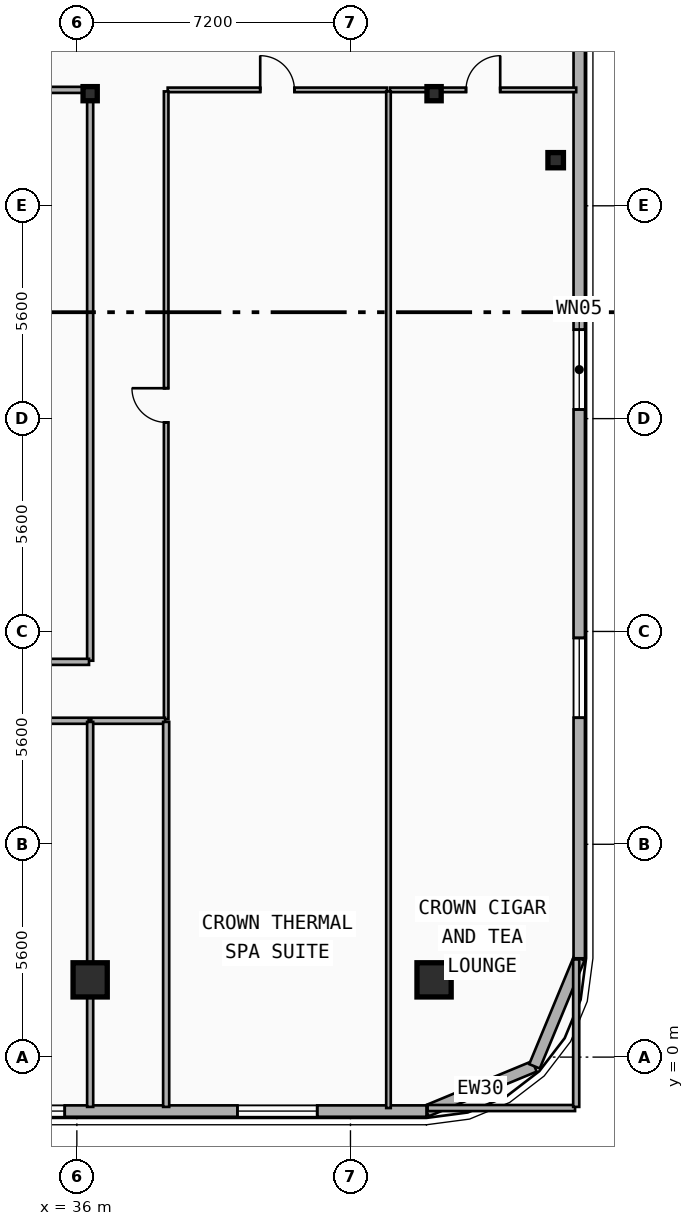
"""IFC4 building model, lengths in metres.
Left out: names, types, materials, properties, quantities, classifications, styles, units other than length and angle.
Written with IfcOpenShell. Run it as: python <this file> out.ifc"""

import sys

from ifc_helpers import new_model, si_unit, direction, frame, frame_2d, origin, origin_2d, place, context, subcontext, project, spatial, rectangle, i_section, extrude, element, fill, save


model = new_model("IFC4")
c1 = context("Model", 3, precision=1e-05, world=origin(), true_north=direction((0.0, 1.0)))
c2 = subcontext(c1, "Body", "Model", "MODEL_VIEW")
j1 = project(units=[si_unit("LENGTHUNIT", "METRE"), si_unit("PLANEANGLEUNIT", "RADIAN")], contexts=[c1])
p1 = place(None, origin())
s1 = spatial("IfcSite", under=j1, at=p1, CompositionType="ELEMENT")
p2 = place(p1, origin())
s2 = spatial("IfcBuilding", under=s1, at=p2, CompositionType="ELEMENT")
p3 = place(p2, frame((0.0, 0.0, 265.8)))
s3 = spatial("IfcBuildingStorey", under=s2, at=p3, CompositionType="ELEMENT", Elevation=265.8)
for number, where, z_axis, x_axis in (
    (1, (36.35, 25.35, 0.0), (0.0, 0.0, 1.0), (1.0, 0.0, 0.0)),
    (2, (45.4, 25.35, 0.0), (0.0, 0.0, 1.0), (1.0, 0.0, 0.0)),
):
    element("IfcColumn", number, at=place(p3, frame(where, z_axis=z_axis, x_axis=x_axis)), inside=s3, PredefinedType="COLUMN", context=c2, shape_type="SweptSolid", body=[
        extrude(i_section(OverallWidth=0.374, OverallDepth=0.372, WebThickness=0.017, FlangeThickness=0.027, FilletRadius=0.015, at=origin_2d()), origin(), (0.0, 0.0, 1.0), 3.7),
    ])
for number, where, z_axis, x_axis in (
    (3, (36.35, 2.141, 0.0), (0.0, -0.09, 0.996), (1.0, 0.0, 0.0)),
    (4, (45.4, 2.141, 0.0), (0.0, -0.09, 0.996), (1.0, 0.0, 0.0)),
):
    element("IfcColumn", number, at=place(p3, frame(where, z_axis=z_axis, x_axis=x_axis)), inside=s3, PredefinedType="COLUMN", context=c2, shape_type="SweptSolid", body=[
        extrude(rectangle(XDim=0.9, YDim=0.9, at=origin_2d()), origin(), (0.0, 0.0, 1.0), 3.715),
    ])
p4 = place(p3, frame((48.6, 23.6, 0.0), z_axis=(0.0, 0.0, 1.0), x_axis=(1.0, 0.0, 0.0)))
e5 = element("IfcColumn", 5, at=p4, inside=s3, PredefinedType="COLUMN", context=c2, shape_type="SweptSolid", body=[
    extrude(i_section(OverallWidth=0.408, OverallDepth=0.4, WebThickness=0.025, FlangeThickness=0.039, FilletRadius=0.015, at=origin_2d()), origin(), (0.0, 0.0, 1.0), 3.7),
])
p5 = place(p3, frame((48.042, -0.243, 0.0), z_axis=(0.0, 0.0, 1.0), x_axis=(-0.92389884758, -0.382636798336, 0.0)))
e6 = element("IfcWall", 6, at=p5, inside=s3, PredefinedType="SOLIDWALL", context=c2, shape_type="SweptSolid", body=[
    extrude(rectangle(XDim=3.077, YDim=0.3, at=frame_2d((1.538, 0.0))), origin(), (0.0, 0.0, 1.0), 3.42),
])
p6 = place(p3, frame((49.22, 2.6, 0.0), z_axis=(0.0, 0.0, 1.0), x_axis=(-0.382676475685, -0.923882414032, 0.0)))
e7 = element("IfcWall", 7, at=p6, inside=s3, PredefinedType="SOLIDWALL", context=c2, shape_type="SweptSolid", body=[
    extrude(rectangle(XDim=3.077, YDim=0.3, at=frame_2d((1.539, 0.0))), origin(), (0.0, 0.0, 1.0), 3.42),
])
p7 = place(p3, frame((49.22, 36.8, 0.0), z_axis=(0.0, 0.0, 1.0), x_axis=(0.0, -1.0, 0.0)))
e8 = element("IfcWall", 8, at=p7, inside=s3, PredefinedType="SOLIDWALL", context=c2, shape_type="SweptSolid", body=[
    extrude(rectangle(XDim=34.2, YDim=0.3, at=frame_2d((17.1, 0.0))), origin(), (0.0, 0.0, 1.0), 3.42),
])
p8 = place(p7, frame((17.66, 0.0, 0.75)))
e9 = element("IfcOpeningElement", 9, at=p8, cuts=e8, PredefinedType="OPENING", context=c2, shape_type="SweptSolid", body=[
    extrude(rectangle(XDim=2.1, YDim=2.1, at=frame_2d((1.05, 1.05))), frame((0.0, 0.16, 0.0), z_axis=(0.0, -1.0, 0.0), x_axis=(1.0, 0.0, 0.0)), (0.0, 0.0, 1.0), 0.32),
])
p9 = place(p7, frame((25.77, 0.0, 0.75)))
e10 = element("IfcOpeningElement", 10, at=p9, cuts=e8, PredefinedType="OPENING", context=c2, shape_type="SweptSolid", body=[
    extrude(rectangle(XDim=2.1, YDim=2.1, at=frame_2d((1.05, 1.05))), frame((0.0, 0.16, 0.0), z_axis=(0.0, -1.0, 0.0), x_axis=(1.0, 0.0, 0.0)), (0.0, 0.0, 1.0), 0.32),
])
p10 = place(p3, frame((45.2, -1.42, 0.0), z_axis=(0.0, 0.0, 1.0), x_axis=(-1.0, 0.0, 0.0)))
e11 = element("IfcWall", 11, at=p10, inside=s3, PredefinedType="SOLIDWALL", context=c2, shape_type="SweptSolid", body=[
    extrude(rectangle(XDim=32.8, YDim=0.3, at=frame_2d((16.4, 0.0))), origin(), (0.0, 0.0, 1.0), 3.42),
])
p11 = place(p10, frame((27.825, 0.0, 0.75)))
e12 = element("IfcOpeningElement", 12, at=p11, cuts=e11, PredefinedType="OPENING", context=c2, shape_type="SweptSolid", body=[
    extrude(rectangle(XDim=2.1, YDim=2.1, at=frame_2d((1.05, 1.05))), frame((0.0, 0.16, 0.0), z_axis=(0.0, -1.0, 0.0), x_axis=(1.0, 0.0, 0.0)), (0.0, 0.0, 1.0), 0.32),
])
p12 = place(p10, frame((20.136, 0.0, 0.75)))
e13 = element("IfcOpeningElement", 13, at=p12, cuts=e11, PredefinedType="OPENING", context=c2, shape_type="SweptSolid", body=[
    extrude(rectangle(XDim=2.1, YDim=2.1, at=frame_2d((1.05, 1.05))), frame((0.0, 0.16, 0.0), z_axis=(0.0, -1.0, 0.0), x_axis=(1.0, 0.0, 0.0)), (0.0, 0.0, 1.0), 0.32),
])
p13 = place(p10, frame((23.163, 0.0, 0.68)))
e14 = element("IfcOpeningElement", 14, at=p13, cuts=e11, PredefinedType="OPENING", context=c2, shape_type="SweptSolid", body=[
    extrude(rectangle(XDim=1.2, YDim=1.5, at=frame_2d((0.6, 0.75))), frame((0.0, 0.16, 0.0), z_axis=(0.0, -1.0, 0.0), x_axis=(1.0, 0.0, 0.0)), (0.0, 0.0, 1.0), 0.32),
])
p14 = place(p10, frame((16.831, 0.0, 0.75)))
e15 = element("IfcOpeningElement", 15, at=p14, cuts=e11, PredefinedType="OPENING", context=c2, shape_type="SweptSolid", body=[
    extrude(rectangle(XDim=2.1, YDim=2.1, at=frame_2d((1.05, 1.05))), frame((0.0, 0.16, 0.0), z_axis=(0.0, -1.0, 0.0), x_axis=(1.0, 0.0, 0.0)), (0.0, 0.0, 1.0), 0.32),
])
p15 = place(p10, frame((9.519, 0.0, 0.75)))
e16 = element("IfcOpeningElement", 16, at=p15, cuts=e11, PredefinedType="OPENING", context=c2, shape_type="SweptSolid", body=[
    extrude(rectangle(XDim=2.1, YDim=2.1, at=frame_2d((1.05, 1.05))), frame((0.0, 0.16, 0.0), z_axis=(0.0, -1.0, 0.0), x_axis=(1.0, 0.0, 0.0)), (0.0, 0.0, 1.0), 0.32),
])
p16 = place(p10, frame((13.176, 0.0, 0.75)))
e17 = element("IfcOpeningElement", 17, at=p16, cuts=e11, PredefinedType="OPENING", context=c2, shape_type="SweptSolid", body=[
    extrude(rectangle(XDim=2.1, YDim=2.1, at=frame_2d((1.05, 1.05))), frame((0.0, 0.16, 0.0), z_axis=(0.0, -1.0, 0.0), x_axis=(1.0, 0.0, 0.0)), (0.0, 0.0, 1.0), 0.32),
])
p17 = place(p10, frame((2.875, 0.0, 0.75)))
e18 = element("IfcOpeningElement", 18, at=p17, cuts=e11, PredefinedType="OPENING", context=c2, shape_type="SweptSolid", body=[
    extrude(rectangle(XDim=2.1, YDim=2.1, at=frame_2d((1.05, 1.05))), frame((0.0, 0.16, 0.0), z_axis=(0.0, -1.0, 0.0), x_axis=(1.0, 0.0, 0.0)), (0.0, 0.0, 1.0), 0.32),
])
p18 = place(p3, frame((38.39, 25.45, 0.0), z_axis=(0.0, 0.0, 1.0), x_axis=(1.0, 0.0, 0.0)))
e19 = element("IfcWall", 19, at=p18, inside=s3, PredefinedType="PARTITIONING", context=c2, shape_type="SweptSolid", body=[
    extrude(rectangle(XDim=5.77, YDim=0.12, at=frame_2d((2.885, 0.0))), origin(), (0.0, 0.0, 1.0), 3.42),
])
p19 = place(p18, frame((2.435, 0.0, 0.0)))
e20 = element("IfcOpeningElement", 20, at=p19, cuts=e19, PredefinedType="OPENING", context=c2, shape_type="SweptSolid", body=[
    extrude(rectangle(XDim=0.9, YDim=2.1, at=frame_2d((0.45, 1.05))), frame((0.0, 0.07, 0.0), z_axis=(0.0, -1.0, 0.0), x_axis=(1.0, 0.0, 0.0)), (0.0, 0.0, 1.0), 0.14),
])
p20 = place(p3, frame((44.24, 25.45, 0.0), z_axis=(0.0, 0.0, 1.0), x_axis=(1.0, 0.0, 0.0)))
e21 = element("IfcWall", 21, at=p20, inside=s3, PredefinedType="PARTITIONING", context=c2, shape_type="SweptSolid", body=[
    extrude(rectangle(XDim=4.9, YDim=0.12, at=frame_2d((2.45, 0.0))), origin(), (0.0, 0.0, 1.0), 2.7),
])
p21 = place(p20, frame((2.0, 0.0, 0.0)))
e22 = element("IfcOpeningElement", 22, at=p21, cuts=e21, PredefinedType="OPENING", context=c2, shape_type="SweptSolid", body=[
    extrude(rectangle(XDim=0.9, YDim=2.1, at=frame_2d((0.45, 1.05))), frame((0.0, 0.07, 0.0), z_axis=(0.0, -1.0, 0.0), x_axis=(1.0, 0.0, 0.0)), (0.0, 0.0, 1.0), 0.14),
])
p22 = place(p3, frame((38.35, 8.89, 0.0), z_axis=(0.0, 0.0, 1.0), x_axis=(0.0, 1.0, 0.0)))
e23 = element("IfcWall", 23, at=p22, inside=s3, PredefinedType="PARTITIONING", context=c2, shape_type="SweptSolid", body=[
    extrude(rectangle(XDim=16.52, YDim=0.12, at=frame_2d((8.26, 0.0))), origin(), (0.0, 0.0, 1.0), 2.91),
])
p23 = place(p22, frame((7.81, 0.0, 0.0)))
e24 = element("IfcOpeningElement", 24, at=p23, cuts=e23, PredefinedType="OPENING", context=c2, shape_type="SweptSolid", body=[
    extrude(rectangle(XDim=0.9, YDim=2.1, at=frame_2d((0.45, 1.05))), frame((0.0, 0.07, 0.0), z_axis=(0.0, -1.0, 0.0), x_axis=(1.0, 0.0, 0.0)), (0.0, 0.0, 1.0), 0.14),
])
p24 = place(p3, frame((32.952, 8.85, 0.0), z_axis=(0.0, 0.0, 1.0), x_axis=(1.0, 0.0, 0.0)))
e25 = element("IfcWall", 25, at=p24, inside=s3, PredefinedType="PARTITIONING", context=c2, shape_type="SweptSolid", body=[
    extrude(rectangle(XDim=3.358, YDim=0.16, at=frame_2d((1.679, 0.0))), origin(), (0.0, 0.0, 1.0), 2.7),
])
p25 = place(p24, frame((1.179, 0.0, 0.0)))
e26 = element("IfcOpeningElement", 26, at=p25, cuts=e25, PredefinedType="OPENING", context=c2, shape_type="SweptSolid", body=[
    extrude(rectangle(XDim=1.0, YDim=2.15, at=frame_2d((0.5, 1.075))), frame((0.0, 0.09, 0.0), z_axis=(0.0, -1.0, 0.0), x_axis=(1.0, 0.0, 0.0)), (0.0, 0.0, 1.0), 0.18),
])
p26 = place(p3, frame((44.2, -1.34, 0.0), z_axis=(0.0, 0.0, 1.0), x_axis=(0.0, 1.0, 0.0)))
e27 = element("IfcWall", 27, at=p26, inside=s3, PredefinedType="PARTITIONING", context=c2, shape_type="SweptSolid", body=[
    extrude(rectangle(XDim=26.75, YDim=0.12, at=frame_2d((13.375, 0.0))), origin(), (0.0, 0.0, 1.0), 2.91),
])
p27 = place(p3, frame((20.48, 25.45, 0.0), z_axis=(0.0, 0.0, 1.0), x_axis=(1.0, 0.0, 0.0)))
e28 = element("IfcWall", 28, at=p27, inside=s3, PredefinedType="PARTITIONING", context=c2, shape_type="SweptSolid", body=[
    extrude(rectangle(XDim=15.84, YDim=0.16, at=frame_2d((7.92, 0.0))), origin(), (0.0, 0.0, 1.0), 2.7),
])
p28 = place(p3, frame((36.38, 8.85, 0.0), z_axis=(0.0, 0.0, 1.0), x_axis=(1.0, 0.0, 0.0)))
e29 = element("IfcWall", 29, at=p28, inside=s3, PredefinedType="PARTITIONING", context=c2, shape_type="SweptSolid", body=[
    extrude(rectangle(XDim=1.94, YDim=0.16, at=frame_2d((0.97, 0.0))), origin(), (0.0, 0.0, 1.0), 2.7),
])
p29 = place(p3, frame((36.35, 10.43, 0.0), z_axis=(0.0, 0.0, 1.0), x_axis=(0.0, 1.0, 0.0)))
e30 = element("IfcWall", 30, at=p29, inside=s3, PredefinedType="PARTITIONING", context=c2, shape_type="SweptSolid", body=[
    extrude(rectangle(XDim=14.99, YDim=0.16, at=frame_2d((7.495, 0.0))), origin(), (0.0, 0.0, 1.0), 2.7),
])
p30 = place(p3, frame((34.48, 10.4, 0.0), z_axis=(0.0, 0.0, 1.0), x_axis=(1.0, 0.0, 0.0)))
e31 = element("IfcWall", 31, at=p30, inside=s3, PredefinedType="PARTITIONING", context=c2, shape_type="SweptSolid", body=[
    extrude(rectangle(XDim=1.84, YDim=0.16, at=frame_2d((0.92, 0.0))), origin(), (0.0, 0.0, 1.0), 2.7),
])
p31 = place(p3, frame((36.35, -1.31, 0.0), z_axis=(0.0, 0.0, 1.0), x_axis=(0.0, 1.0, 0.0)))
e32 = element("IfcWall", 32, at=p31, inside=s3, PredefinedType="PARTITIONING", context=c2, shape_type="SweptSolid", body=[
    extrude(rectangle(XDim=10.13, YDim=0.16, at=frame_2d((5.065, 0.0))), origin(), (0.0, 0.0, 1.0), 2.7),
])
p32 = place(p3, frame((38.35, -1.31, 0.0), z_axis=(0.0, 0.0, 1.0), x_axis=(0.0, 1.0, 0.0)))
e33 = element("IfcWall", 33, at=p32, inside=s3, PredefinedType="PARTITIONING", context=c2, shape_type="SweptSolid", body=[
    extrude(rectangle(XDim=10.13, YDim=0.16, at=frame_2d((5.065, 0.0))), origin(), (0.0, 0.0, 1.0), 2.91),
])
for number, where, z_axis, x_axis in (
    (34, (45.23, -1.34, 0.0), (0.0, 0.0, 1.0), (1.0, 0.0, 0.0)),
    (35, (49.14, -1.31, 0.0), (0.0, 0.0, 1.0), (0.0, 1.0, 0.0)),
):
    element("IfcWall", number, at=place(p3, frame(where, z_axis=z_axis, x_axis=x_axis)), inside=s3, PredefinedType="PARTITIONING", context=c2, shape_type="SweptSolid", body=[
        extrude(rectangle(XDim=3.88, YDim=0.16, at=frame_2d((1.94, 0.0))), origin(), (0.0, 0.0, 1.0), 3.42),
    ])
p33 = place(p8, origin())
e36 = element("IfcWindow", 36, at=p33, inside=s3, PartitioningType="SINGLE_PANEL", PredefinedType="WINDOW", context=c2, shape_type="SweptSolid", body=[
    extrude(rectangle(XDim=2.1, YDim=2.1, at=frame_2d((1.05, 1.05))), frame((0.0, 0.03, 0.0), z_axis=(0.0, -1.0, 0.0), x_axis=(1.0, 0.0, 0.0)), (0.0, 0.0, 1.0), 0.06),
])
fill(e9, e36)
p34 = place(p9, origin())
e37 = element("IfcWindow", 37, at=p34, inside=s3, PartitioningType="SINGLE_PANEL", PredefinedType="WINDOW", context=c2, shape_type="SweptSolid", body=[
    extrude(rectangle(XDim=2.1, YDim=2.1, at=frame_2d((1.05, 1.05))), frame((0.0, 0.03, 0.0), z_axis=(0.0, -1.0, 0.0), x_axis=(1.0, 0.0, 0.0)), (0.0, 0.0, 1.0), 0.06),
])
fill(e10, e37)
p35 = place(p15, origin())
e38 = element("IfcWindow", 38, at=p35, inside=s3, PartitioningType="SINGLE_PANEL", PredefinedType="WINDOW", context=c2, shape_type="SweptSolid", body=[
    extrude(rectangle(XDim=2.1, YDim=2.1, at=frame_2d((1.05, 1.05))), frame((0.0, 0.03, 0.0), z_axis=(0.0, -1.0, 0.0), x_axis=(1.0, 0.0, 0.0)), (0.0, 0.0, 1.0), 0.06),
])
fill(e16, e38)
p36 = place(p17, origin())
e39 = element("IfcWindow", 39, at=p36, inside=s3, PartitioningType="SINGLE_PANEL", PredefinedType="WINDOW", context=c2, shape_type="SweptSolid", body=[
    extrude(rectangle(XDim=2.1, YDim=2.1, at=frame_2d((1.05, 1.05))), frame((0.0, 0.03, 0.0), z_axis=(0.0, -1.0, 0.0), x_axis=(1.0, 0.0, 0.0)), (0.0, 0.0, 1.0), 0.06),
])
fill(e18, e39)
p37 = place(p19, origin())
e40 = element("IfcDoor", 40, at=p37, inside=s3, OperationType="SINGLE_SWING_LEFT", PredefinedType="DOOR", context=c2, shape_type="SweptSolid", body=[
    extrude(rectangle(XDim=0.9, YDim=2.1, at=frame_2d((0.45, 1.05))), frame((0.0, 0.025, 0.0), z_axis=(0.0, -1.0, 0.0), x_axis=(1.0, 0.0, 0.0)), (0.0, 0.0, 1.0), 0.05),
])
fill(e20, e40)
p38 = place(p21, origin())
e41 = element("IfcDoor", 41, at=p38, inside=s3, OperationType="SINGLE_SWING_RIGHT", PredefinedType="DOOR", context=c2, shape_type="SweptSolid", body=[
    extrude(rectangle(XDim=0.9, YDim=2.1, at=frame_2d((0.45, 1.05))), frame((0.0, 0.025, 0.0), z_axis=(0.0, -1.0, 0.0), x_axis=(1.0, 0.0, 0.0)), (0.0, 0.0, 1.0), 0.05),
])
fill(e22, e41)
p39 = place(p23, origin())
e42 = element("IfcDoor", 42, at=p39, inside=s3, OperationType="SINGLE_SWING_RIGHT", PredefinedType="DOOR", context=c2, shape_type="SweptSolid", body=[
    extrude(rectangle(XDim=0.9, YDim=2.1, at=frame_2d((0.45, 1.05))), frame((0.0, 0.025, 0.0), z_axis=(0.0, -1.0, 0.0), x_axis=(1.0, 0.0, 0.0)), (0.0, 0.0, 1.0), 0.05),
])
fill(e24, e42)
save(model, sys.argv[1])
